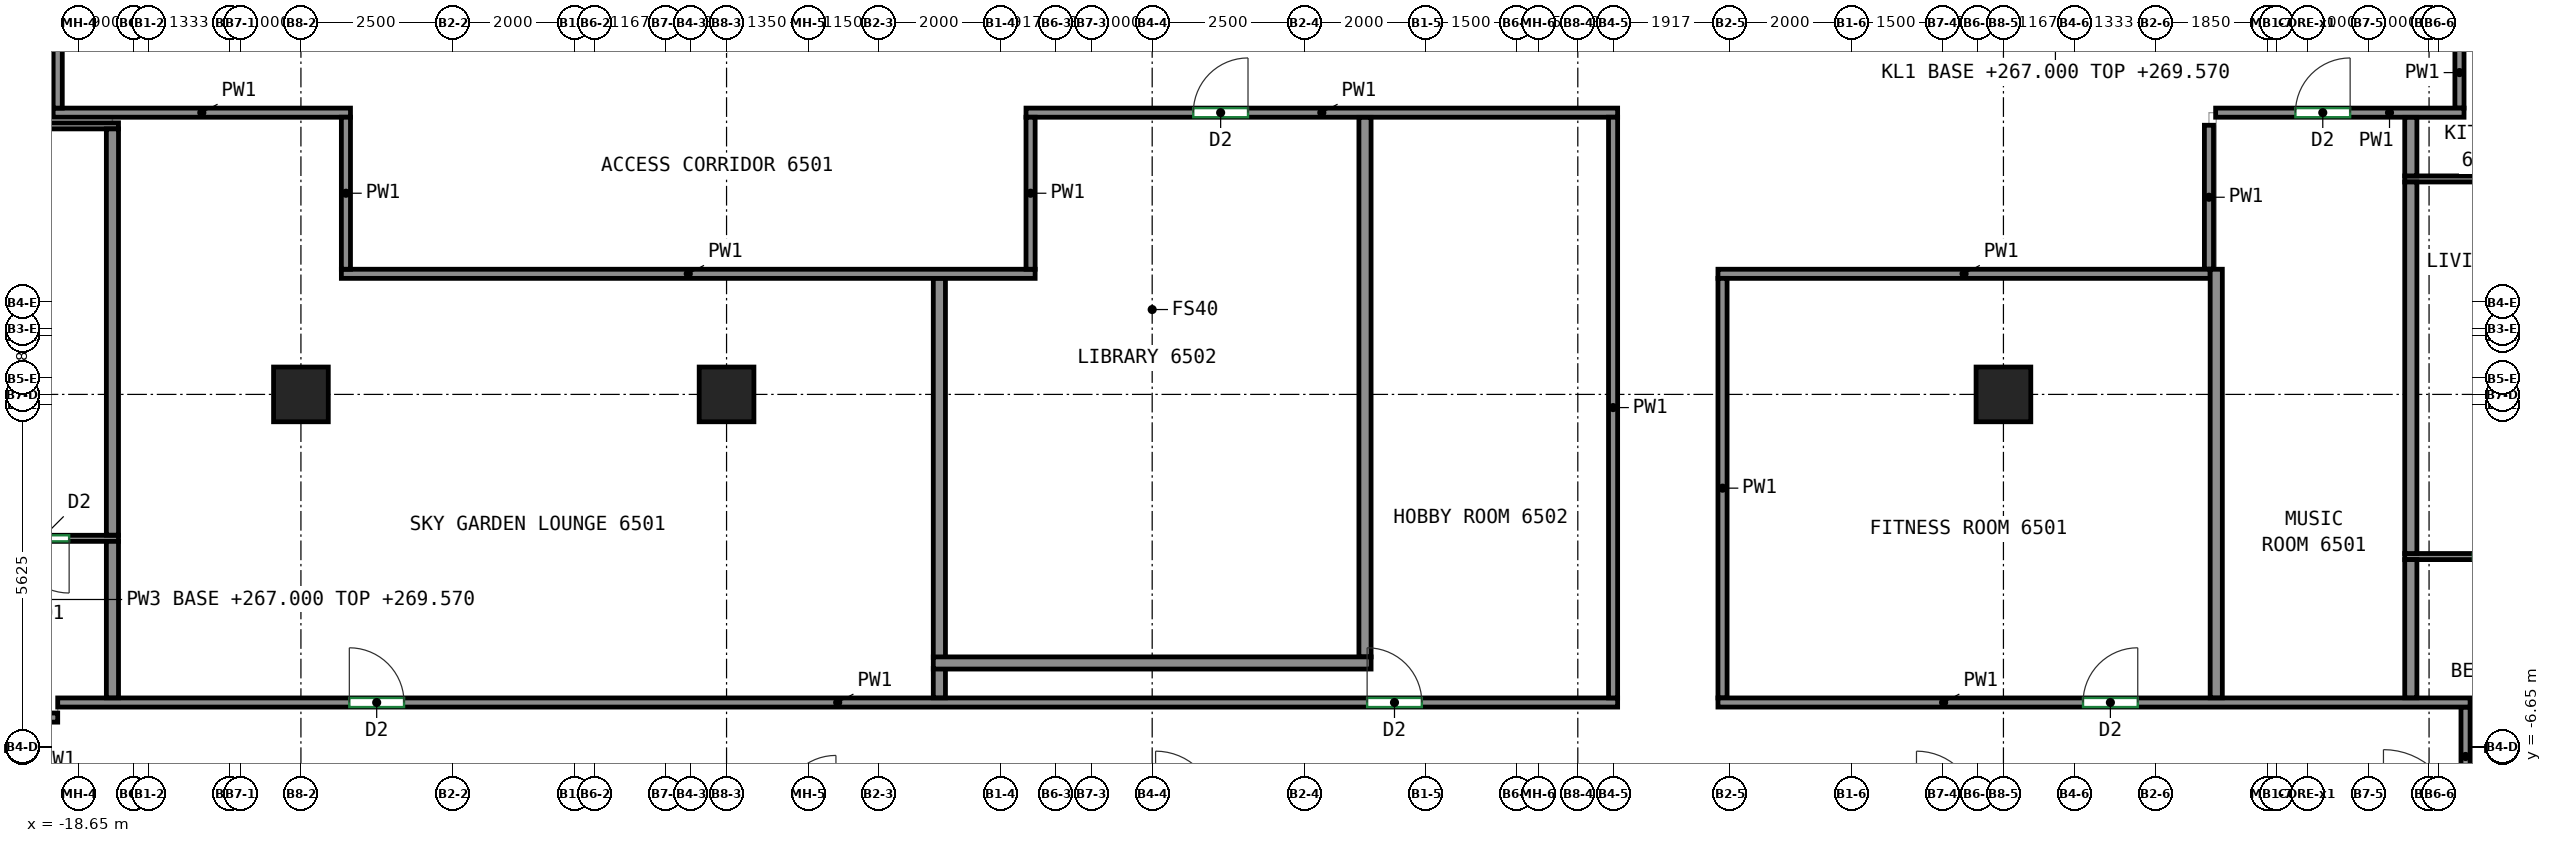
"""IFC4 building model, lengths in metres.
Left out: names, types, materials, properties, quantities, classifications, styles, units other than length and angle.
Written with IfcOpenShell. Run it as: python <this file> out.ifc"""

import sys

from ifc_helpers import new_model, si_unit, direction, frame, frame_2d, origin, origin_2d, place, context, subcontext, project, spatial, rectangle, extrude, source, transform, mapped, element, fill, save


model = new_model("IFC4")
c1 = context("Model", 3, precision=1e-05, world=origin(), true_north=direction((0.0, 1.0)))
c2 = subcontext(c1, "Body", "Model", "MODEL_VIEW")
j1 = project(units=[si_unit("LENGTHUNIT", "METRE"), si_unit("PLANEANGLEUNIT", "RADIAN")], contexts=[c1])
p1 = place(None, origin())
s1 = spatial("IfcSite", under=j1, at=p1, CompositionType="ELEMENT")
p2 = place(p1, origin())
s2 = spatial("IfcBuilding", under=s1, at=p2, CompositionType="ELEMENT")
p3 = place(p2, frame((0.0, 0.0, 267.0)))
s3 = spatial("IfcBuildingStorey", under=s2, at=p3, CompositionType="ELEMENT", Elevation=267.0)
m1 = source(origin(), c2, "Body", "SweptSolid", [
    extrude(rectangle(XDim=0.9, YDim=0.9, at=origin_2d()), origin(), (0.0, 0.0, 1.0), 3.12),
])
for number, where, z_axis, x_axis in (
    (1, (-15.0, -0.833, 0.0), (0.0, 0.0, 1.0), (1.0, 0.0, 0.0)),
    (2, (-8.0, -0.833, 0.0), (0.0, 0.0, 1.0), (1.0, 0.0, 0.0)),
    (3, (13.0, -0.833, 0.0), (0.0, 0.0, 1.0), (1.0, 0.0, 0.0)),
):
    element("IfcColumn", number, at=place(p3, frame(where, z_axis=z_axis, x_axis=x_axis)), inside=s3, PredefinedType="COLUMN", context=c2, shape_type="MappedRepresentation", body=[
        mapped(m1, transform((0.0, 0.0, 0.0))),
    ])
p4 = place(p3, frame((-19.0, -6.148, 0.0), z_axis=(0.0, 0.0, 1.0), x_axis=(-1.0, 0.0, 0.0)))
e4 = element("IfcWall", 4, at=p4, inside=s3, PredefinedType="PARTITIONING", context=c2, shape_type="SweptSolid", body=[
    extrude(rectangle(XDim=0.602, YDim=0.15, at=frame_2d((0.301, 0.0))), origin(), (0.0, 0.0, 1.0), 3.12),
])
p5 = place(p3, frame((-19.0, -5.9, 0.0), z_axis=(0.0, 0.0, 1.0), x_axis=(1.0, 0.0, 0.0)))
e5 = element("IfcWall", 5, at=p5, inside=s3, PredefinedType="PARTITIONING", context=c2, shape_type="SweptSolid", body=[
    extrude(rectangle(XDim=25.655, YDim=0.15, at=frame_2d((12.828, 0.0))), origin(), (0.0, 0.0, 1.0), 3.12),
])
p6 = place(p5, frame((4.796, 0.0, 0.0)))
e6 = element("IfcOpeningElement", 6, at=p6, cuts=e5, PredefinedType="OPENING", context=c2, shape_type="SweptSolid", body=[
    extrude(rectangle(XDim=0.9, YDim=2.1, at=frame_2d((0.45, 1.05))), frame((0.0, 0.085, 0.0), z_axis=(0.0, -1.0, 0.0), x_axis=(1.0, 0.0, 0.0)), (0.0, 0.0, 1.0), 0.17),
])
p7 = place(p5, frame((21.535, 0.0, 0.0)))
e7 = element("IfcOpeningElement", 7, at=p7, cuts=e5, PredefinedType="OPENING", context=c2, shape_type="SweptSolid", body=[
    extrude(rectangle(XDim=0.9, YDim=2.1, at=frame_2d((0.45, 1.05))), frame((0.0, 0.085, 0.0), z_axis=(0.0, -1.0, 0.0), x_axis=(1.0, 0.0, 0.0)), (0.0, 0.0, 1.0), 0.17),
])
p8 = place(p3, frame((-19.075, 3.8, 0.0), z_axis=(0.0, 0.0, 1.0), x_axis=(1.0, 0.0, 0.0)))
e8 = element("IfcWall", 8, at=p8, inside=s3, PredefinedType="PARTITIONING", context=c2, shape_type="SweptSolid", body=[
    extrude(rectangle(XDim=4.89, YDim=0.15, at=frame_2d((2.445, 0.0))), origin(), (0.0, 0.0, 1.0), 3.12),
])
p9 = place(p3, frame((-19.0, 3.875, 0.0), z_axis=(0.0, 0.0, 1.0), x_axis=(0.0, 1.0, 0.0)))
e9 = element("IfcWall", 9, at=p9, inside=s3, PredefinedType="PARTITIONING", context=c2, shape_type="SweptSolid", body=[
    extrude(rectangle(XDim=4.035, YDim=0.15, at=frame_2d((2.018, 0.0))), origin(), (0.0, 0.0, 1.0), 3.12),
])
p10 = place(p3, frame((20.6, -7.6, 0.0), z_axis=(0.0, 0.0, 1.0), x_axis=(0.0, 1.0, 0.0)))
e10 = element("IfcWall", 10, at=p10, inside=s3, PredefinedType="PARTITIONING", context=c2, shape_type="SweptSolid", body=[
    extrude(rectangle(XDim=1.625, YDim=0.15, at=frame_2d((0.812, 0.0))), origin(), (0.0, 0.0, 1.0), 3.12),
])
p11 = place(p3, frame((20.5, 3.875, 0.0), z_axis=(0.0, 0.0, 1.0), x_axis=(0.0, 1.0, 0.0)))
e11 = element("IfcWall", 11, at=p11, inside=s3, PredefinedType="PARTITIONING", context=c2, shape_type="SweptSolid", body=[
    extrude(rectangle(XDim=1.168, YDim=0.15, at=frame_2d((0.584, 0.0))), origin(), (0.0, 0.0, 1.0), 3.12),
])
p12 = place(p3, frame((-14.335, 1.15, 0.0), z_axis=(0.0, 0.0, 1.0), x_axis=(1.0, 0.0, 0.0)))
e12 = element("IfcWall", 12, at=p12, inside=s3, PredefinedType="PARTITIONING", context=c2, shape_type="SweptSolid", body=[
    extrude(rectangle(XDim=11.41, YDim=0.15, at=frame_2d((5.705, 0.0))), origin(), (0.0, 0.0, 1.0), 3.12),
])
p13 = place(p3, frame((-14.26, 3.725, 0.0), z_axis=(0.0, 0.0, 1.0), x_axis=(0.0, -1.0, 0.0)))
e13 = element("IfcWall", 13, at=p13, inside=s3, PredefinedType="PARTITIONING", context=c2, shape_type="SweptSolid", body=[
    extrude(rectangle(XDim=2.5, YDim=0.15, at=frame_2d((1.25, 0.0))), origin(), (0.0, 0.0, 1.0), 3.12),
])
p14 = place(p3, frame((-3.075, 3.8, 0.0), z_axis=(0.0, 0.0, 1.0), x_axis=(1.0, 0.0, 0.0)))
e14 = element("IfcWall", 14, at=p14, inside=s3, PredefinedType="PARTITIONING", context=c2, shape_type="SweptSolid", body=[
    extrude(rectangle(XDim=9.73, YDim=0.15, at=frame_2d((4.865, 0.0))), origin(), (0.0, 0.0, 1.0), 3.12),
])
p15 = place(p14, frame((2.751, 0.0, 0.0)))
e15 = element("IfcOpeningElement", 15, at=p15, cuts=e14, PredefinedType="OPENING", context=c2, shape_type="SweptSolid", body=[
    extrude(rectangle(XDim=0.9, YDim=2.1, at=frame_2d((0.45, 1.05))), frame((0.0, 0.085, 0.0), z_axis=(0.0, -1.0, 0.0), x_axis=(1.0, 0.0, 0.0)), (0.0, 0.0, 1.0), 0.17),
])
p16 = place(p3, frame((-3.0, 1.225, 0.0), z_axis=(0.0, 0.0, 1.0), x_axis=(0.0, 1.0, 0.0)))
e16 = element("IfcWall", 16, at=p16, inside=s3, PredefinedType="PARTITIONING", context=c2, shape_type="SweptSolid", body=[
    extrude(rectangle(XDim=2.5, YDim=0.15, at=frame_2d((1.25, 0.0))), origin(), (0.0, 0.0, 1.0), 3.12),
])
p17 = place(p3, frame((6.58, 3.725, 0.0), z_axis=(0.0, 0.0, 1.0), x_axis=(0.0, -1.0, 0.0)))
e17 = element("IfcWall", 17, at=p17, inside=s3, PredefinedType="PARTITIONING", context=c2, shape_type="SweptSolid", body=[
    extrude(rectangle(XDim=9.55, YDim=0.15, at=frame_2d((4.775, 0.0))), origin(), (0.0, 0.0, 1.0), 3.12),
])
p18 = place(p3, frame((16.38, 1.225, 0.0), z_axis=(0.0, 0.0, 1.0), x_axis=(0.0, 1.0, 0.0)))
e18 = element("IfcWall", 18, at=p18, inside=s3, PredefinedType="PARTITIONING", context=c2, shape_type="SweptSolid", body=[
    extrude(rectangle(XDim=2.368, YDim=0.15, at=frame_2d((1.184, 0.0))), origin(), (0.0, 0.0, 1.0), 3.12),
])
p19 = place(p3, frame((8.305, 1.15, 0.0), z_axis=(0.0, 0.0, 1.0), x_axis=(1.0, 0.0, 0.0)))
e19 = element("IfcWall", 19, at=p19, inside=s3, PredefinedType="PARTITIONING", context=c2, shape_type="SweptSolid", body=[
    extrude(rectangle(XDim=8.095, YDim=0.15, at=frame_2d((4.047, 0.0))), origin(), (0.0, 0.0, 1.0), 3.12),
])
p20 = place(p3, frame((8.38, -5.825, 0.0), z_axis=(0.0, 0.0, 1.0), x_axis=(0.0, 1.0, 0.0)))
e20 = element("IfcWall", 20, at=p20, inside=s3, PredefinedType="PARTITIONING", context=c2, shape_type="SweptSolid", body=[
    extrude(rectangle(XDim=6.9, YDim=0.15, at=frame_2d((3.45, 0.0))), origin(), (0.0, 0.0, 1.0), 3.12),
])
p21 = place(p3, frame((8.305, -5.9, 0.0), z_axis=(0.0, 0.0, 1.0), x_axis=(1.0, 0.0, 0.0)))
e21 = element("IfcWall", 21, at=p21, inside=s3, PredefinedType="PARTITIONING", context=c2, shape_type="SweptSolid", body=[
    extrude(rectangle(XDim=12.37, YDim=0.15, at=frame_2d((6.185, 0.0))), origin(), (0.0, 0.0, 1.0), 3.12),
])
p22 = place(p21, frame((6.004, 0.0, 0.0)))
e22 = element("IfcOpeningElement", 22, at=p22, cuts=e21, PredefinedType="OPENING", context=c2, shape_type="SweptSolid", body=[
    extrude(rectangle(XDim=0.9, YDim=2.1, at=frame_2d((0.45, 1.05))), frame((0.0, 0.085, 0.0), z_axis=(0.0, -1.0, 0.0), x_axis=(1.0, 0.0, 0.0)), (0.0, 0.0, 1.0), 0.17),
])
p23 = place(p3, frame((16.49, 3.8, 0.0), z_axis=(0.0, 0.0, 1.0), x_axis=(1.0, 0.0, 0.0)))
e23 = element("IfcWall", 23, at=p23, inside=s3, PredefinedType="PARTITIONING", context=c2, shape_type="SweptSolid", body=[
    extrude(rectangle(XDim=4.085, YDim=0.15, at=frame_2d((2.042, 0.0))), origin(), (0.0, 0.0, 1.0), 3.12),
])
p24 = place(p23, frame((1.312, 0.0, 0.0)))
e24 = element("IfcOpeningElement", 24, at=p24, cuts=e23, PredefinedType="OPENING", context=c2, shape_type="SweptSolid", body=[
    extrude(rectangle(XDim=0.9, YDim=2.1, at=frame_2d((0.45, 1.05))), frame((0.0, 0.085, 0.0), z_axis=(0.0, -1.0, 0.0), x_axis=(1.0, 0.0, 0.0)), (0.0, 0.0, 1.0), 0.17),
])
p25 = place(p3, frame((-18.0, -3.2, 0.0), z_axis=(0.0, 0.0, 1.0), x_axis=(-1.0, 0.0, 0.0)))
e25 = element("IfcWall", 25, at=p25, inside=s3, PredefinedType="PARTITIONING", context=c2, shape_type="SweptSolid", body=[
    extrude(rectangle(XDim=3.75, YDim=0.1, at=frame_2d((1.875, 0.0))), origin(), (0.0, 0.0, 1.0), 3.12),
])
p26 = place(p25, frame((0.812, 0.0, 0.0)))
e26 = element("IfcOpeningElement", 26, at=p26, cuts=e25, PredefinedType="OPENING", context=c2, shape_type="SweptSolid", body=[
    extrude(rectangle(XDim=0.9, YDim=2.1, at=frame_2d((0.45, 1.05))), frame((0.0, 0.06, 0.0), z_axis=(0.0, -1.0, 0.0), x_axis=(1.0, 0.0, 0.0)), (0.0, 0.0, 1.0), 0.12),
])
p27 = place(p3, frame((-18.1, -5.823, 0.0), z_axis=(0.0, 0.0, 1.0), x_axis=(0.0, 1.0, 0.0)))
e27 = element("IfcWall", 27, at=p27, inside=s3, PredefinedType="PARTITIONING", context=c2, shape_type="SweptSolid", body=[
    extrude(rectangle(XDim=2.573, YDim=0.2, at=frame_2d((1.287, 0.0))), origin(), (0.0, 0.0, 1.0), 3.12),
])
p28 = place(p3, frame((-18.0, 3.583, 0.0), z_axis=(0.0, 0.0, 1.0), x_axis=(-1.0, 0.0, 0.0)))
e28 = element("IfcWall", 28, at=p28, inside=s3, PredefinedType="PARTITIONING", context=c2, shape_type="SweptSolid", body=[
    extrude(rectangle(XDim=7.25, YDim=0.1, at=frame_2d((3.625, 0.0))), origin(), (0.0, 0.0, 1.0), 3.12),
])
p29 = place(p28, frame((2.822, 0.0, 0.0)))
e29 = element("IfcOpeningElement", 29, at=p29, cuts=e28, PredefinedType="OPENING", context=c2, shape_type="SweptSolid", body=[
    extrude(rectangle(XDim=0.9, YDim=2.1, at=frame_2d((0.45, 1.05))), frame((0.0, 0.06, 0.0), z_axis=(0.0, -1.0, 0.0), x_axis=(1.0, 0.0, 0.0)), (0.0, 0.0, 1.0), 0.12),
])
p30 = place(p3, frame((-18.1, -3.148, 0.0), z_axis=(0.0, 0.0, 1.0), x_axis=(0.0, 1.0, 0.0)))
e30 = element("IfcWall", 30, at=p30, inside=s3, PredefinedType="PARTITIONING", context=c2, shape_type="SweptSolid", body=[
    extrude(rectangle(XDim=6.681, YDim=0.2, at=frame_2d((3.34, 0.0))), origin(), (0.0, 0.0, 1.0), 3.12),
])
p31 = place(p3, frame((23.25, -3.5, 0.0), z_axis=(0.0, 0.0, 1.0), x_axis=(-1.0, 0.0, 0.0)))
e31 = element("IfcWall", 31, at=p31, inside=s3, PredefinedType="PARTITIONING", context=c2, shape_type="SweptSolid", body=[
    extrude(rectangle(XDim=3.65, YDim=0.1, at=frame_2d((1.825, 0.0))), origin(), (0.0, 0.0, 1.0), 3.12),
])
p32 = place(p31, frame((1.63, 0.0, 0.0)))
e32 = element("IfcOpeningElement", 32, at=p32, cuts=e31, PredefinedType="OPENING", context=c2, shape_type="SweptSolid", body=[
    extrude(rectangle(XDim=0.9, YDim=2.1, at=frame_2d((0.45, 1.05))), frame((0.0, 0.06, 0.0), z_axis=(0.0, -1.0, 0.0), x_axis=(1.0, 0.0, 0.0)), (0.0, 0.0, 1.0), 0.12),
])
p33 = place(p3, frame((19.7, -5.823, 0.0), z_axis=(0.0, 0.0, 1.0), x_axis=(0.0, 1.0, 0.0)))
e33 = element("IfcWall", 33, at=p33, inside=s3, PredefinedType="PARTITIONING", context=c2, shape_type="SweptSolid", body=[
    extrude(rectangle(XDim=2.273, YDim=0.2, at=frame_2d((1.136, 0.0))), origin(), (0.0, 0.0, 1.0), 3.12),
])
p34 = place(p3, frame((23.25, 2.71, 0.0), z_axis=(0.0, 0.0, 1.0), x_axis=(-1.0, 0.0, 0.0)))
e34 = element("IfcWall", 34, at=p34, inside=s3, PredefinedType="PARTITIONING", context=c2, shape_type="SweptSolid", body=[
    extrude(rectangle(XDim=3.65, YDim=0.1, at=frame_2d((1.825, 0.0))), origin(), (0.0, 0.0, 1.0), 3.12),
])
p35 = place(p34, frame((0.404, 0.0, 0.0)))
e35 = element("IfcOpeningElement", 35, at=p35, cuts=e34, PredefinedType="OPENING", context=c2, shape_type="SweptSolid", body=[
    extrude(rectangle(XDim=0.9, YDim=2.1, at=frame_2d((0.45, 1.05))), frame((0.0, 0.06, 0.0), z_axis=(0.0, -1.0, 0.0), x_axis=(1.0, 0.0, 0.0)), (0.0, 0.0, 1.0), 0.12),
])
p36 = place(p3, frame((19.7, -3.45, 0.0), z_axis=(0.0, 0.0, 1.0), x_axis=(0.0, 1.0, 0.0)))
e36 = element("IfcWall", 36, at=p36, inside=s3, PredefinedType="PARTITIONING", context=c2, shape_type="SweptSolid", body=[
    extrude(rectangle(XDim=6.11, YDim=0.2, at=frame_2d((3.055, 0.0))), origin(), (0.0, 0.0, 1.0), 3.12),
])
p37 = place(p3, frame((19.7, 2.76, 0.0), z_axis=(0.0, 0.0, 1.0), x_axis=(0.0, 1.0, 0.0)))
e37 = element("IfcWall", 37, at=p37, inside=s3, PredefinedType="PARTITIONING", context=c2, shape_type="SweptSolid", body=[
    extrude(rectangle(XDim=0.963, YDim=0.2, at=frame_2d((0.481, 0.0))), origin(), (0.0, 0.0, 1.0), 3.12),
])
p38 = place(p3, frame((-4.5, -5.16, 0.0), z_axis=(0.0, 0.0, 1.0), x_axis=(0.0, 1.0, 0.0)))
e38 = element("IfcWall", 38, at=p38, inside=s3, PredefinedType="PARTITIONING", context=c2, shape_type="SweptSolid", body=[
    extrude(rectangle(XDim=6.233, YDim=0.2, at=frame_2d((3.116, 0.0))), origin(), (0.0, 0.0, 1.0), 3.12),
])
p39 = place(p3, frame((-4.5, -5.823, 0.0), z_axis=(0.0, 0.0, 1.0), x_axis=(0.0, 1.0, 0.0)))
e39 = element("IfcWall", 39, at=p39, inside=s3, PredefinedType="PARTITIONING", context=c2, shape_type="SweptSolid", body=[
    extrude(rectangle(XDim=0.483, YDim=0.2, at=frame_2d((0.241, 0.0))), origin(), (0.0, 0.0, 1.0), 3.12),
])
p40 = place(p3, frame((2.5, -5.15, 0.0), z_axis=(0.0, 0.0, 1.0), x_axis=(0.0, 1.0, 0.0)))
e40 = element("IfcWall", 40, at=p40, inside=s3, PredefinedType="PARTITIONING", context=c2, shape_type="SweptSolid", body=[
    extrude(rectangle(XDim=8.873, YDim=0.2, at=frame_2d((4.437, 0.0))), origin(), (0.0, 0.0, 1.0), 3.12),
])
p41 = place(p3, frame((-4.6, -5.25, 0.0), z_axis=(0.0, 0.0, 1.0), x_axis=(1.0, 0.0, 0.0)))
e41 = element("IfcWall", 41, at=p41, inside=s3, PredefinedType="PARTITIONING", context=c2, shape_type="SweptSolid", body=[
    extrude(rectangle(XDim=7.2, YDim=0.2, at=frame_2d((3.6, 0.0))), origin(), (0.0, 0.0, 1.0), 3.12),
])
p42 = place(p3, frame((16.5, -5.823, 0.0), z_axis=(0.0, 0.0, 1.0), x_axis=(0.0, 1.0, 0.0)))
e42 = element("IfcWall", 42, at=p42, inside=s3, PredefinedType="PARTITIONING", context=c2, shape_type="SweptSolid", body=[
    extrude(rectangle(XDim=7.048, YDim=0.2, at=frame_2d((3.524, 0.0))), origin(), (0.0, 0.0, 1.0), 3.12),
])
p43 = place(p6, origin())
e43 = element("IfcDoor", 43, at=p43, inside=s3, OperationType="SINGLE_SWING_LEFT", PredefinedType="DOOR", context=c2, shape_type="SweptSolid", body=[
    extrude(rectangle(XDim=0.9, YDim=2.1, at=frame_2d((0.45, 1.05))), frame((0.0, 0.025, 0.0), z_axis=(0.0, -1.0, 0.0), x_axis=(1.0, 0.0, 0.0)), (0.0, 0.0, 1.0), 0.05),
])
fill(e6, e43)
p44 = place(p7, origin())
e44 = element("IfcDoor", 44, at=p44, inside=s3, OperationType="SINGLE_SWING_LEFT", PredefinedType="DOOR", context=c2, shape_type="SweptSolid", body=[
    extrude(rectangle(XDim=0.9, YDim=2.1, at=frame_2d((0.45, 1.05))), frame((0.0, 0.025, 0.0), z_axis=(0.0, -1.0, 0.0), x_axis=(1.0, 0.0, 0.0)), (0.0, 0.0, 1.0), 0.05),
])
fill(e7, e44)
p45 = place(p22, origin())
e45 = element("IfcDoor", 45, at=p45, inside=s3, OperationType="SINGLE_SWING_RIGHT", PredefinedType="DOOR", context=c2, shape_type="SweptSolid", body=[
    extrude(rectangle(XDim=0.9, YDim=2.1, at=frame_2d((0.45, 1.05))), frame((0.0, 0.025, 0.0), z_axis=(0.0, -1.0, 0.0), x_axis=(1.0, 0.0, 0.0)), (0.0, 0.0, 1.0), 0.05),
])
fill(e22, e45)
p46 = place(p26, origin())
e46 = element("IfcDoor", 46, at=p46, inside=s3, OperationType="SINGLE_SWING_LEFT", PredefinedType="DOOR", context=c2, shape_type="SweptSolid", body=[
    extrude(rectangle(XDim=0.9, YDim=2.1, at=frame_2d((0.45, 1.05))), frame((0.0, 0.025, 0.0), z_axis=(0.0, -1.0, 0.0), x_axis=(1.0, 0.0, 0.0)), (0.0, 0.0, 1.0), 0.05),
])
fill(e26, e46)
p47 = place(p15, origin())
e47 = element("IfcDoor", 47, at=p47, inside=s3, OperationType="SINGLE_SWING_RIGHT", PredefinedType="DOOR", context=c2, shape_type="SweptSolid", body=[
    extrude(rectangle(XDim=0.9, YDim=2.1, at=frame_2d((0.45, 1.05))), frame((0.0, 0.025, 0.0), z_axis=(0.0, -1.0, 0.0), x_axis=(1.0, 0.0, 0.0)), (0.0, 0.0, 1.0), 0.05),
])
fill(e15, e47)
p48 = place(p24, origin())
e48 = element("IfcDoor", 48, at=p48, inside=s3, OperationType="SINGLE_SWING_RIGHT", PredefinedType="DOOR", context=c2, shape_type="SweptSolid", body=[
    extrude(rectangle(XDim=0.9, YDim=2.1, at=frame_2d((0.45, 1.05))), frame((0.0, 0.025, 0.0), z_axis=(0.0, -1.0, 0.0), x_axis=(1.0, 0.0, 0.0)), (0.0, 0.0, 1.0), 0.05),
])
fill(e24, e48)
save(model, sys.argv[1])
